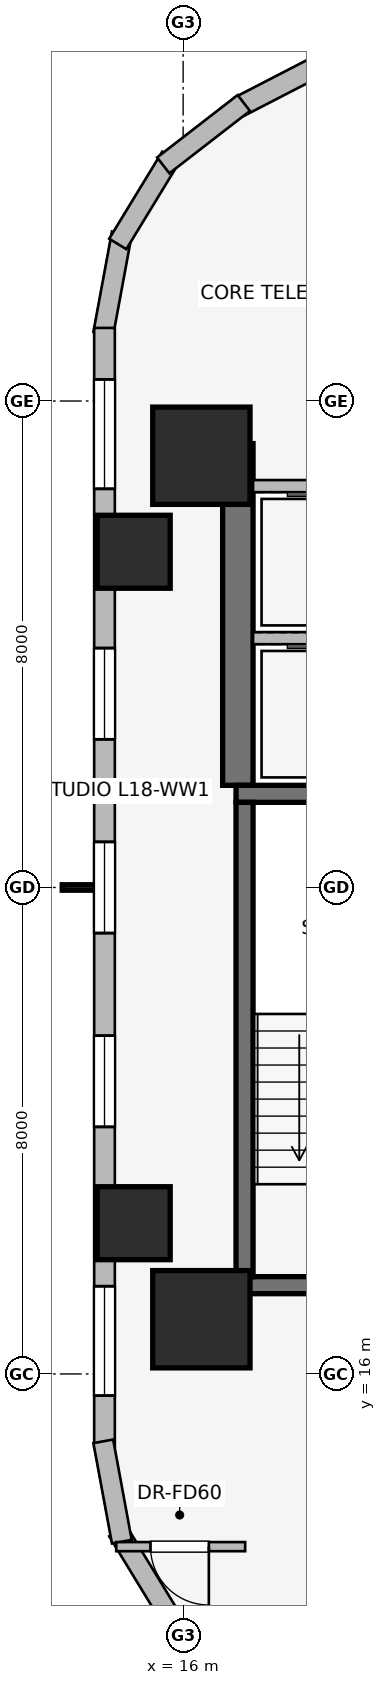
"""IFC4 building model, lengths in metres.
Left out: names, types, materials, properties, quantities, classifications, styles, units other than length and angle.
Written with IfcOpenShell. Run it as: python <this file> out.ifc"""

import sys

from ifc_helpers import new_model, si_unit, direction, frame, frame_2d, origin, origin_2d, place, context, subcontext, project, spatial, rectangle, extrude, element, fill, save


model = new_model("IFC4")
c1 = context("Model", 3, precision=1e-05, world=origin(), true_north=direction((0.0, 1.0)))
c2 = subcontext(c1, "Body", "Model", "MODEL_VIEW")
j1 = project(units=[si_unit("LENGTHUNIT", "METRE"), si_unit("PLANEANGLEUNIT", "RADIAN")], contexts=[c1])
p1 = place(None, origin())
s1 = spatial("IfcSite", under=j1, at=p1, CompositionType="ELEMENT")
p2 = place(p1, origin())
s2 = spatial("IfcBuilding", under=s1, at=p2, CompositionType="ELEMENT")
p3 = place(p2, frame((0.0, 0.0, 70.8)))
s3 = spatial("IfcBuildingStorey", under=s2, at=p3, CompositionType="ELEMENT", Elevation=70.8)
p4 = place(p3, frame((16.9, 25.68, 0.0), z_axis=(0.0, 0.0, 1.0), x_axis=(0.0, 1.0, 0.0)))
e1 = element("IfcWall", 1, at=p4, inside=s3, PredefinedType="SHEAR", context=c2, shape_type="SweptSolid", body=[
    extrude(rectangle(XDim=5.62, YDim=0.5, at=frame_2d((2.81, 0.0))), origin(), (0.0, 0.0, 1.0), 3.65),
])
for number, where, z_axis, x_axis in (
    (2, (16.87, 17.46, 0.0), (0.0, 0.0, 1.0), (1.0, 0.0, 0.0)),
    (3, (20.63, 25.54, 0.0), (0.0, 0.0, 1.0), (-1.0, 0.0, 0.0)),
):
    element("IfcWall", number, at=place(p3, frame(where, z_axis=z_axis, x_axis=x_axis)), inside=s3, PredefinedType="SHEAR", context=c2, shape_type="SweptSolid", body=[
        extrude(rectangle(XDim=3.76, YDim=0.28, at=frame_2d((1.88, 0.0))), origin(), (0.0, 0.0, 1.0), 3.65),
    ])
p5 = place(p3, frame((17.01, 25.4, 0.0), z_axis=(0.0, 0.0, 1.0), x_axis=(0.0, -1.0, 0.0)))
e4 = element("IfcWall", 4, at=p5, inside=s3, PredefinedType="SHEAR", context=c2, shape_type="SweptSolid", body=[
    extrude(rectangle(XDim=7.8, YDim=0.28, at=frame_2d((3.9, 0.0))), origin(), (0.0, 0.0, 1.0), 3.65),
])
for number, where, z_axis, x_axis in (
    (5, (16.3, 16.9, 0.0), (0.0, 0.0, 1.0), (1.0, 0.0, 0.0)),
    (6, (16.3, 31.1, 0.0), (0.0, 0.0, 1.0), (1.0, 0.0, 0.0)),
):
    element("IfcColumn", number, at=place(p3, frame(where, z_axis=z_axis, x_axis=x_axis)), inside=s3, PredefinedType="COLUMN", context=c2, shape_type="SweptSolid", body=[
        extrude(rectangle(XDim=1.6, YDim=1.6, at=origin_2d()), origin(), (0.0, 0.0, 1.0), 3.65),
    ])
for number, where, z_axis, x_axis in (
    (7, (15.187, 29.521, 0.0), (0.0, 0.0, 1.0), (1.0, 0.0, 0.0)),
    (8, (15.187, 18.479, 0.0), (0.0, 0.0, 1.0), (1.0, 0.0, 0.0)),
):
    element("IfcColumn", number, at=place(p3, frame(where, z_axis=z_axis, x_axis=x_axis)), inside=s3, PredefinedType="COLUMN", context=c2, shape_type="SweptSolid", body=[
        extrude(rectangle(XDim=1.2, YDim=1.2, at=origin_2d()), origin(), (0.0, 0.0, 1.0), 3.65),
    ])
p6 = place(p3, frame((16.924, 36.841, 0.0), z_axis=(0.0, 0.0, 1.0), x_axis=(0.888634413993, 0.458616264721, 0.0)))
e9 = element("IfcWall", 9, at=p6, inside=s3, PredefinedType="STANDARD", context=c2, shape_type="SweptSolid", body=[
    extrude(rectangle(XDim=20.531, YDim=0.34, at=frame_2d((10.266, 0.0))), origin(), (0.0, 0.0, 1.0), 2.684),
])
p7 = place(p6, frame((2.161, 0.0, 0.75)))
e10 = element("IfcOpeningElement", 10, at=p7, cuts=e9, PredefinedType="OPENING", context=c2, shape_type="SweptSolid", body=[
    extrude(rectangle(XDim=1.05, YDim=1.4, at=frame_2d((0.525, 0.7))), frame((0.0, 0.18, 0.0), z_axis=(0.0, -1.0, 0.0), x_axis=(1.0, 0.0, 0.0)), (0.0, 0.0, 1.0), 0.36),
])
p8 = place(p6, frame((5.903, 0.0, 0.75)))
e11 = element("IfcOpeningElement", 11, at=p8, cuts=e9, PredefinedType="OPENING", context=c2, shape_type="SweptSolid", body=[
    extrude(rectangle(XDim=1.5, YDim=1.5, at=frame_2d((0.75, 0.75))), frame((0.0, 0.18, 0.0), z_axis=(0.0, -1.0, 0.0), x_axis=(1.0, 0.0, 0.0)), (0.0, 0.0, 1.0), 0.36),
])
p9 = place(p6, frame((9.516, 0.0, 0.75)))
e12 = element("IfcOpeningElement", 12, at=p9, cuts=e9, PredefinedType="OPENING", context=c2, shape_type="SweptSolid", body=[
    extrude(rectangle(XDim=1.5, YDim=1.5, at=frame_2d((0.75, 0.75))), frame((0.0, 0.18, 0.0), z_axis=(0.0, -1.0, 0.0), x_axis=(1.0, 0.0, 0.0)), (0.0, 0.0, 1.0), 0.36),
])
p10 = place(p6, frame((13.129, 0.0, 0.75)))
e13 = element("IfcOpeningElement", 13, at=p10, cuts=e9, PredefinedType="OPENING", context=c2, shape_type="SweptSolid", body=[
    extrude(rectangle(XDim=1.5, YDim=1.5, at=frame_2d((0.75, 0.75))), frame((0.0, 0.18, 0.0), z_axis=(0.0, -1.0, 0.0), x_axis=(1.0, 0.0, 0.0)), (0.0, 0.0, 1.0), 0.36),
])
p11 = place(p6, frame((17.476, 0.0, 0.75)))
e14 = element("IfcOpeningElement", 14, at=p11, cuts=e9, PredefinedType="OPENING", context=c2, shape_type="SweptSolid", body=[
    extrude(rectangle(XDim=1.05, YDim=1.4, at=frame_2d((0.525, 0.7))), frame((0.0, 0.18, 0.0), z_axis=(0.0, -1.0, 0.0), x_axis=(1.0, 0.0, 0.0)), (0.0, 0.0, 1.0), 0.36),
])
p12 = place(p3, frame((14.687, 33.108, 0.0), z_axis=(0.0, 0.0, 1.0), x_axis=(0.181714143354, 0.983351397063, 0.0)))
e15 = element("IfcWall", 15, at=p12, inside=s3, PredefinedType="STANDARD", context=c2, shape_type="SweptSolid", body=[
    extrude(rectangle(XDim=1.678, YDim=0.33, at=frame_2d((0.839, 0.0))), origin(), (0.0, 0.0, 1.0), 3.39),
])
p13 = place(p3, frame((14.925, 34.583, 0.0), z_axis=(0.0, 0.0, 1.0), x_axis=(0.520584129191, 0.853810379671, 0.0)))
e16 = element("IfcWall", 16, at=p13, inside=s3, PredefinedType="STANDARD", context=c2, shape_type="SweptSolid", body=[
    extrude(rectangle(XDim=1.677, YDim=0.33, at=frame_2d((0.838, 0.0))), origin(), (0.0, 0.0, 1.0), 3.39),
])
p14 = place(p3, frame((15.673, 35.875, 0.0), z_axis=(0.0, 0.0, 1.0), x_axis=(0.790691856293, 0.61221433207, 0.0)))
e17 = element("IfcWall", 17, at=p14, inside=s3, PredefinedType="STANDARD", context=c2, shape_type="SweptSolid", body=[
    extrude(rectangle(XDim=1.676, YDim=0.33, at=frame_2d((0.838, 0.0))), origin(), (0.0, 0.0, 1.0), 3.39),
])
p15 = place(p3, frame((14.707, 14.798, 0.0), z_axis=(0.0, 0.0, 1.0), x_axis=(0.0, 1.0, 0.0)))
e18 = element("IfcWall", 18, at=p15, inside=s3, PredefinedType="STANDARD", context=c2, shape_type="SweptSolid", body=[
    extrude(rectangle(XDim=18.404, YDim=0.34, at=frame_2d((9.202, 0.0))), origin(), (0.0, 0.0, 1.0), 2.684),
])
p16 = place(p15, frame((0.845, 0.0, 0.75)))
e19 = element("IfcOpeningElement", 19, at=p16, cuts=e18, PredefinedType="OPENING", context=c2, shape_type="SweptSolid", body=[
    extrude(rectangle(XDim=1.8, YDim=1.5, at=frame_2d((0.9, 0.75))), frame((0.0, 0.18, 0.0), z_axis=(0.0, -1.0, 0.0), x_axis=(1.0, 0.0, 0.0)), (0.0, 0.0, 1.0), 0.36),
])
p17 = place(p15, frame((5.265, 0.0, 0.75)))
e20 = element("IfcOpeningElement", 20, at=p17, cuts=e18, PredefinedType="OPENING", context=c2, shape_type="SweptSolid", body=[
    extrude(rectangle(XDim=1.5, YDim=1.5, at=frame_2d((0.75, 0.75))), frame((0.0, 0.18, 0.0), z_axis=(0.0, -1.0, 0.0), x_axis=(1.0, 0.0, 0.0)), (0.0, 0.0, 1.0), 0.36),
])
p18 = place(p15, frame((8.452, 0.0, 0.75)))
e21 = element("IfcOpeningElement", 21, at=p18, cuts=e18, PredefinedType="OPENING", context=c2, shape_type="SweptSolid", body=[
    extrude(rectangle(XDim=1.5, YDim=1.5, at=frame_2d((0.75, 0.75))), frame((0.0, 0.18, 0.0), z_axis=(0.0, -1.0, 0.0), x_axis=(1.0, 0.0, 0.0)), (0.0, 0.0, 1.0), 0.36),
])
p19 = place(p15, frame((11.639, 0.0, 0.75)))
e22 = element("IfcOpeningElement", 22, at=p19, cuts=e18, PredefinedType="OPENING", context=c2, shape_type="SweptSolid", body=[
    extrude(rectangle(XDim=1.5, YDim=1.5, at=frame_2d((0.75, 0.75))), frame((0.0, 0.18, 0.0), z_axis=(0.0, -1.0, 0.0), x_axis=(1.0, 0.0, 0.0)), (0.0, 0.0, 1.0), 0.36),
])
p20 = place(p15, frame((15.758, 0.0, 0.75)))
e23 = element("IfcOpeningElement", 23, at=p20, cuts=e18, PredefinedType="OPENING", context=c2, shape_type="SweptSolid", body=[
    extrude(rectangle(XDim=1.8, YDim=1.5, at=frame_2d((0.9, 0.75))), frame((0.0, 0.18, 0.0), z_axis=(0.0, -1.0, 0.0), x_axis=(1.0, 0.0, 0.0)), (0.0, 0.0, 1.0), 0.36),
])
p21 = place(p3, frame((16.998, 11.099, 0.0), z_axis=(0.0, 0.0, 1.0), x_axis=(-0.790691856293, 0.61221433207, 0.0)))
e24 = element("IfcWall", 24, at=p21, inside=s3, PredefinedType="STANDARD", context=c2, shape_type="SweptSolid", body=[
    extrude(rectangle(XDim=1.676, YDim=0.33, at=frame_2d((0.838, 0.0))), origin(), (0.0, 0.0, 1.0), 3.39),
])
p22 = place(p3, frame((15.798, 11.985, 0.0), z_axis=(0.0, 0.0, 1.0), x_axis=(-0.520584129191, 0.853810379671, 0.0)))
e25 = element("IfcWall", 25, at=p22, inside=s3, PredefinedType="STANDARD", context=c2, shape_type="SweptSolid", body=[
    extrude(rectangle(XDim=1.677, YDim=0.33, at=frame_2d((0.838, 0.0))), origin(), (0.0, 0.0, 1.0), 3.39),
])
p23 = place(p3, frame((14.992, 13.242, 0.0), z_axis=(0.0, 0.0, 1.0), x_axis=(-0.181714143354, 0.983351397063, 0.0)))
e26 = element("IfcWall", 26, at=p23, inside=s3, PredefinedType="STANDARD", context=c2, shape_type="SweptSolid", body=[
    extrude(rectangle(XDim=1.678, YDim=0.33, at=frame_2d((0.839, 0.0))), origin(), (0.0, 0.0, 1.0), 3.39),
])
p24 = place(p3, frame((17.15, 28.1, 0.0), z_axis=(0.0, 0.0, 1.0), x_axis=(1.0, 0.0, 0.0)))
e27 = element("IfcWall", 27, at=p24, inside=s3, PredefinedType="PARTITIONING", context=c2, shape_type="SweptSolid", body=[
    extrude(rectangle(XDim=2.5, YDim=0.2, at=frame_2d((1.25, 0.0))), origin(), (0.0, 0.0, 1.0), 3.39),
])
p25 = place(p3, frame((19.65, 30.6, 0.0), z_axis=(0.0, 0.0, 1.0), x_axis=(-1.0, 0.0, 0.0)))
e28 = element("IfcWall", 28, at=p25, inside=s3, PredefinedType="PARTITIONING", context=c2, shape_type="SweptSolid", body=[
    extrude(rectangle(XDim=2.5, YDim=0.2, at=frame_2d((1.25, 0.0))), origin(), (0.0, 0.0, 1.0), 2.29),
])
p26 = place(p3, frame((17.02, 13.16, 0.0), z_axis=(0.0, 0.0, 1.0), x_axis=(-1.0, 0.0, 0.0)))
e29 = element("IfcWall", 29, at=p26, inside=s3, PredefinedType="PARTITIONING", context=c2, shape_type="SweptSolid", body=[
    extrude(rectangle(XDim=2.12, YDim=0.15, at=frame_2d((1.06, 0.0))), origin(), (0.0, 0.0, 1.0), 3.39),
])
p27 = place(p26, frame((0.597, 0.0, 0.0)))
e30 = element("IfcOpeningElement", 30, at=p27, cuts=e29, PredefinedType="OPENING", context=c2, shape_type="SweptSolid", body=[
    extrude(rectangle(XDim=0.96, YDim=2.0, at=frame_2d((0.48, 1.0))), frame((0.0, 0.085, 0.0), z_axis=(0.0, -1.0, 0.0), x_axis=(1.0, 0.0, 0.0)), (0.0, 0.0, 1.0), 0.17),
])
p28 = place(p16, origin())
e31 = element("IfcWindow", 31, at=p28, inside=s3, PartitioningType="SINGLE_PANEL", PredefinedType="WINDOW", context=c2, shape_type="SweptSolid", body=[
    extrude(rectangle(XDim=1.8, YDim=1.5, at=frame_2d((0.9, 0.75))), frame((0.0, 0.03, 0.0), z_axis=(0.0, -1.0, 0.0), x_axis=(1.0, 0.0, 0.0)), (0.0, 0.0, 1.0), 0.06),
])
fill(e19, e31)
p29 = place(p17, origin())
e32 = element("IfcWindow", 32, at=p29, inside=s3, PartitioningType="SINGLE_PANEL", PredefinedType="WINDOW", context=c2, shape_type="SweptSolid", body=[
    extrude(rectangle(XDim=1.5, YDim=1.5, at=frame_2d((0.75, 0.75))), frame((0.0, 0.03, 0.0), z_axis=(0.0, -1.0, 0.0), x_axis=(1.0, 0.0, 0.0)), (0.0, 0.0, 1.0), 0.06),
])
fill(e20, e32)
p30 = place(p18, origin())
e33 = element("IfcWindow", 33, at=p30, inside=s3, PartitioningType="SINGLE_PANEL", PredefinedType="WINDOW", context=c2, shape_type="SweptSolid", body=[
    extrude(rectangle(XDim=1.5, YDim=1.5, at=frame_2d((0.75, 0.75))), frame((0.0, 0.03, 0.0), z_axis=(0.0, -1.0, 0.0), x_axis=(1.0, 0.0, 0.0)), (0.0, 0.0, 1.0), 0.06),
])
fill(e21, e33)
p31 = place(p19, origin())
e34 = element("IfcWindow", 34, at=p31, inside=s3, PartitioningType="SINGLE_PANEL", PredefinedType="WINDOW", context=c2, shape_type="SweptSolid", body=[
    extrude(rectangle(XDim=1.5, YDim=1.5, at=frame_2d((0.75, 0.75))), frame((0.0, 0.03, 0.0), z_axis=(0.0, -1.0, 0.0), x_axis=(1.0, 0.0, 0.0)), (0.0, 0.0, 1.0), 0.06),
])
fill(e22, e34)
p32 = place(p20, origin())
e35 = element("IfcWindow", 35, at=p32, inside=s3, PartitioningType="SINGLE_PANEL", PredefinedType="WINDOW", context=c2, shape_type="SweptSolid", body=[
    extrude(rectangle(XDim=1.8, YDim=1.5, at=frame_2d((0.9, 0.75))), frame((0.0, 0.03, 0.0), z_axis=(0.0, -1.0, 0.0), x_axis=(1.0, 0.0, 0.0)), (0.0, 0.0, 1.0), 0.06),
])
fill(e23, e35)
p33 = place(p27, origin())
e36 = element("IfcDoor", 36, at=p33, inside=s3, OperationType="SINGLE_SWING_LEFT", PredefinedType="DOOR", context=c2, shape_type="SweptSolid", body=[
    extrude(rectangle(XDim=0.96, YDim=2.0, at=frame_2d((0.48, 1.0))), frame((0.0, 0.025, 0.0), z_axis=(0.0, -1.0, 0.0), x_axis=(1.0, 0.0, 0.0)), (0.0, 0.0, 1.0), 0.05),
])
fill(e30, e36)
save(model, sys.argv[1])
